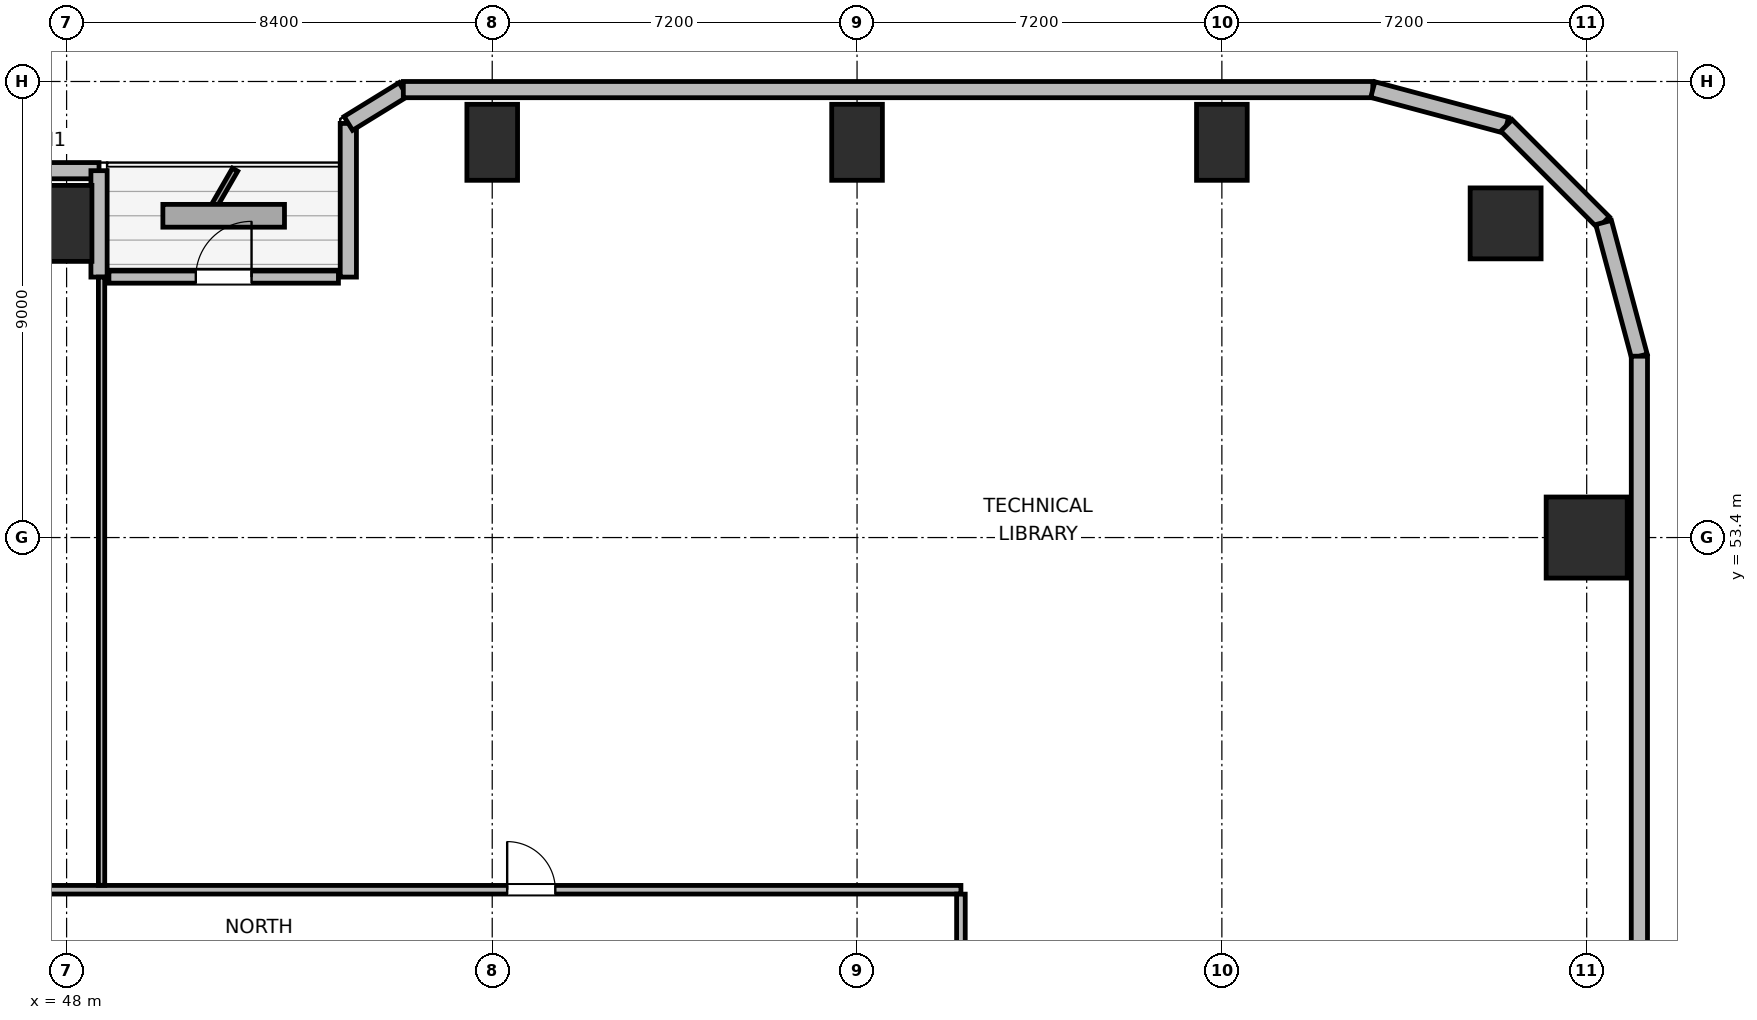
"""IFC4 building model, lengths in metres.
Left out: names, types, materials, properties, quantities, classifications, styles, units other than length and angle.
Written with IfcOpenShell. Run it as: python <this file> out.ifc"""

import sys

from ifc_helpers import new_model, si_unit, direction, frame, frame_2d, origin, origin_2d, place, context, subcontext, project, spatial, rectangle, circle, extrude, element, fill, save


model = new_model("IFC4")
c1 = context("Model", 3, precision=1e-05, world=origin(), true_north=direction((0.0, 1.0)))
c2 = subcontext(c1, "Body", "Model", "MODEL_VIEW")
j1 = project(units=[si_unit("LENGTHUNIT", "METRE"), si_unit("PLANEANGLEUNIT", "RADIAN")], contexts=[c1])
p1 = place(None, origin())
s1 = spatial("IfcSite", under=j1, at=p1, CompositionType="ELEMENT")
p2 = place(p1, origin())
s2 = spatial("IfcBuilding", under=s1, at=p2, CompositionType="ELEMENT")
p3 = place(p2, frame((0.0, 0.0, 25.5)))
s3 = spatial("IfcBuildingStorey", under=s2, at=p3, CompositionType="ELEMENT", Elevation=25.5)
p4 = place(p3, frame((76.4, 59.6, 0.0), z_axis=(0.0, 0.0, 1.0), x_axis=(1.0, 0.0, 0.0)))
e1 = element("IfcColumn", 1, at=p4, inside=s3, PredefinedType="COLUMN", context=c2, shape_type="SweptSolid", body=[
    extrude(circle(Radius=0.7, at=origin_2d()), origin(), (0.0, 0.0, 1.0), 3.9),
])
for number, where, z_axis, x_axis in (
    (2, (48.0, 59.6, 0.0), (0.0, 0.0, 1.0), (1.0, 0.0, 0.0)),
    (3, (56.4, 61.2, 0.0), (0.0, 0.0, 1.0), (1.0, 0.0, 0.0)),
    (4, (63.6, 61.2, 0.0), (0.0, 0.0, 1.0), (1.0, 0.0, 0.0)),
    (5, (70.8, 61.2, 0.0), (0.0, 0.0, 1.0), (1.0, 0.0, 0.0)),
):
    element("IfcColumn", number, at=place(p3, frame(where, z_axis=z_axis, x_axis=x_axis)), inside=s3, PredefinedType="COLUMN", context=c2, shape_type="SweptSolid", body=[
        extrude(rectangle(XDim=1.0, YDim=1.5, at=origin_2d()), origin(), (0.0, 0.0, 1.0), 3.9),
    ])
p5 = place(p3, frame((78.0, 53.4, 0.0), z_axis=(0.0, 0.0, 1.0), x_axis=(1.0, 0.0, 0.0)))
e6 = element("IfcColumn", 6, at=p5, inside=s3, PredefinedType="COLUMN", context=c2, shape_type="SweptSolid", body=[
    extrude(rectangle(XDim=1.6, YDim=1.6, at=origin_2d()), origin(), (0.0, 0.0, 1.0), 3.9),
])
p6 = place(p3, frame((43.955, 60.64, 0.0), z_axis=(0.0, 0.0, 1.0), x_axis=(1.0, 0.0, 0.0)))
e7 = element("IfcWall", 7, at=p6, inside=s3, PredefinedType="SOLIDWALL", context=c2, shape_type="SweptSolid", body=[
    extrude(rectangle(XDim=4.685, YDim=0.32, at=frame_2d((2.343, 0.0))), origin(), (0.0, 0.0, 1.0), 2.875),
])
p7 = place(p6, frame((1.443, 0.0, 0.85)))
e8 = element("IfcOpeningElement", 8, at=p7, cuts=e7, PredefinedType="OPENING", context=c2, shape_type="SweptSolid", body=[
    extrude(rectangle(XDim=1.8, YDim=1.1, at=frame_2d((0.9, 0.55))), frame((0.0, 0.17, 0.0), z_axis=(0.0, -1.0, 0.0), x_axis=(1.0, 0.0, 0.0)), (0.0, 0.0, 1.0), 0.34),
])
p8 = place(p3, frame((48.64, 60.64, 0.0), z_axis=(0.0, 0.0, 1.0), x_axis=(0.0, -1.0, 0.0)))
e9 = element("IfcWall", 9, at=p8, inside=s3, PredefinedType="SOLIDWALL", context=c2, shape_type="SweptSolid", body=[
    extrude(rectangle(XDim=2.1, YDim=0.32, at=frame_2d((1.05, 0.0))), origin(), (0.0, 0.0, 1.0), 2.875),
])
p9 = place(p3, frame((48.835, 58.54, 0.0), z_axis=(0.0, 0.0, 1.0), x_axis=(1.0, 0.0, 0.0)))
e10 = element("IfcWall", 10, at=p9, inside=s3, PredefinedType="SOLIDWALL", context=c2, shape_type="SweptSolid", body=[
    extrude(rectangle(XDim=4.53, YDim=0.24, at=frame_2d((2.265, 0.0))), origin(), (0.0, 0.0, 1.0), 3.64),
])
p10 = place(p9, frame((1.715, 0.0, 0.0)))
e11 = element("IfcOpeningElement", 11, at=p10, cuts=e10, PredefinedType="OPENING", context=c2, shape_type="SweptSolid", body=[
    extrude(rectangle(XDim=1.1, YDim=2.04, at=frame_2d((0.55, 1.02))), frame((0.0, 0.13, 0.0), z_axis=(0.0, -1.0, 0.0), x_axis=(1.0, 0.0, 0.0)), (0.0, 0.0, 1.0), 0.26),
])
p11 = place(p3, frame((53.56, 58.54, 0.0), z_axis=(0.0, 0.0, 1.0), x_axis=(0.0, 1.0, 0.0)))
e12 = element("IfcWall", 12, at=p11, inside=s3, PredefinedType="SOLIDWALL", context=c2, shape_type="SweptSolid", body=[
    extrude(rectangle(XDim=3.032, YDim=0.32, at=frame_2d((1.516, 0.0))), origin(), (0.0, 0.0, 1.0), 2.875),
])
p12 = place(p3, frame((53.56, 61.573, 0.0), z_axis=(0.0, 0.0, 1.0), x_axis=(0.851776724646, 0.523904964045, 0.0)))
e13 = element("IfcWall", 13, at=p12, inside=s3, PredefinedType="SOLIDWALL", context=c2, shape_type="SweptSolid", body=[
    extrude(rectangle(XDim=1.274, YDim=0.32, at=frame_2d((0.637, 0.0))), origin(), (0.0, 0.0, 1.0), 3.64),
])
p13 = place(p3, frame((54.645, 62.24, 0.0), z_axis=(0.0, 0.0, 1.0), x_axis=(1.0, 0.0, 0.0)))
e14 = element("IfcWall", 14, at=p13, inside=s3, PredefinedType="SOLIDWALL", context=c2, shape_type="SweptSolid", body=[
    extrude(rectangle(XDim=19.134, YDim=0.32, at=frame_2d((9.567, 0.0))), origin(), (0.0, 0.0, 1.0), 3.64),
])
p14 = place(p3, frame((73.779, 62.24, 0.0), z_axis=(0.0, 0.0, 1.0), x_axis=(0.965964405026, -0.25867502435, 0.0)))
e15 = element("IfcWall", 15, at=p14, inside=s3, PredefinedType="SOLIDWALL", context=c2, shape_type="SweptSolid", body=[
    extrude(rectangle(XDim=2.731, YDim=0.32, at=frame_2d((1.366, 0.0))), origin(), (0.0, 0.0, 1.0), 3.64),
])
p15 = place(p3, frame((76.417, 61.533, 0.0), z_axis=(0.0, 0.0, 1.0), x_axis=(0.707106781187, -0.707106781187, 0.0)))
e16 = element("IfcWall", 16, at=p15, inside=s3, PredefinedType="SOLIDWALL", context=c2, shape_type="SweptSolid", body=[
    extrude(rectangle(XDim=2.71, YDim=0.32, at=frame_2d((1.355, 0.0))), origin(), (0.0, 0.0, 1.0), 3.64),
])
p16 = place(p3, frame((78.333, 59.617, 0.0), z_axis=(0.0, 0.0, 1.0), x_axis=(0.25869736047, -0.965958423373, 0.0)))
e17 = element("IfcWall", 17, at=p16, inside=s3, PredefinedType="SOLIDWALL", context=c2, shape_type="SweptSolid", body=[
    extrude(rectangle(XDim=2.731, YDim=0.32, at=frame_2d((1.366, 0.0))), origin(), (0.0, 0.0, 1.0), 3.64),
])
p17 = place(p3, frame((79.04, 56.979, 0.0), z_axis=(0.0, 0.0, 1.0), x_axis=(0.0, -1.0, 0.0)))
e18 = element("IfcWall", 18, at=p17, inside=s3, PredefinedType="SOLIDWALL", context=c2, shape_type="SweptSolid", body=[
    extrude(rectangle(XDim=14.219, YDim=0.32, at=frame_2d((7.109, 0.0))), origin(), (0.0, 0.0, 1.0), 3.64),
])
p18 = place(p3, frame((30.35, 46.45, 0.0), z_axis=(0.0, 0.0, 1.0), x_axis=(1.0, 0.0, 0.0)))
e19 = element("IfcWall", 19, at=p18, inside=s3, PredefinedType="PARTITIONING", context=c2, shape_type="SweptSolid", body=[
    extrude(rectangle(XDim=35.3, YDim=0.17, at=frame_2d((17.65, 0.0))), origin(), (0.0, 0.0, 1.0), 3.64),
])
p19 = place(p18, frame((6.21, 0.0, 0.0)))
e20 = element("IfcOpeningElement", 20, at=p19, cuts=e19, PredefinedType="OPENING", context=c2, shape_type="SweptSolid", body=[
    extrude(rectangle(XDim=0.95, YDim=2.04, at=frame_2d((0.475, 1.02))), frame((0.0, 0.095, 0.0), z_axis=(0.0, -1.0, 0.0), x_axis=(1.0, 0.0, 0.0)), (0.0, 0.0, 1.0), 0.19),
])
p20 = place(p18, frame((15.38, 0.0, 0.0)))
e21 = element("IfcOpeningElement", 21, at=p20, cuts=e19, PredefinedType="OPENING", context=c2, shape_type="SweptSolid", body=[
    extrude(rectangle(XDim=0.95, YDim=2.04, at=frame_2d((0.475, 1.02))), frame((0.0, 0.095, 0.0), z_axis=(0.0, -1.0, 0.0), x_axis=(1.0, 0.0, 0.0)), (0.0, 0.0, 1.0), 0.19),
])
p21 = place(p18, frame((26.345, 0.0, 0.0)))
e22 = element("IfcOpeningElement", 22, at=p21, cuts=e19, PredefinedType="OPENING", context=c2, shape_type="SweptSolid", body=[
    extrude(rectangle(XDim=0.95, YDim=2.04, at=frame_2d((0.475, 1.02))), frame((0.0, 0.095, 0.0), z_axis=(0.0, -1.0, 0.0), x_axis=(1.0, 0.0, 0.0)), (0.0, 0.0, 1.0), 0.19),
])
p22 = place(p3, frame((65.65, 25.637, 0.0), z_axis=(0.0, 0.0, 1.0), x_axis=(0.0, 1.0, 0.0)))
e23 = element("IfcWall", 23, at=p22, inside=s3, PredefinedType="PARTITIONING", context=c2, shape_type="SweptSolid", body=[
    extrude(rectangle(XDim=20.726, YDim=0.17, at=frame_2d((10.363, 0.0))), origin(), (0.0, 0.0, 1.0), 3.64),
])
p23 = place(p22, frame((4.163, 0.0, 0.0)))
e24 = element("IfcOpeningElement", 24, at=p23, cuts=e23, PredefinedType="OPENING", context=c2, shape_type="SweptSolid", body=[
    extrude(rectangle(XDim=0.95, YDim=2.04, at=frame_2d((0.475, 1.02))), frame((0.0, 0.095, 0.0), z_axis=(0.0, -1.0, 0.0), x_axis=(1.0, 0.0, 0.0)), (0.0, 0.0, 1.0), 0.19),
])
p24 = place(p22, frame((14.613, 0.0, 0.0)))
e25 = element("IfcOpeningElement", 25, at=p24, cuts=e23, PredefinedType="OPENING", context=c2, shape_type="SweptSolid", body=[
    extrude(rectangle(XDim=0.95, YDim=2.04, at=frame_2d((0.475, 1.02))), frame((0.0, 0.095, 0.0), z_axis=(0.0, -1.0, 0.0), x_axis=(1.0, 0.0, 0.0)), (0.0, 0.0, 1.0), 0.19),
])
p25 = place(p3, frame((48.69, 46.537, 0.0), z_axis=(0.0, 0.0, 1.0), x_axis=(0.0, 1.0, 0.0)))
e26 = element("IfcWall", 26, at=p25, inside=s3, PredefinedType="PARTITIONING", context=c2, shape_type="SweptSolid", body=[
    extrude(rectangle(XDim=12.003, YDim=0.125, at=frame_2d((6.001, 0.0))), origin(), (0.0, 0.0, 1.0), 3.64),
])
p26 = place(p10, origin())
e27 = element("IfcDoor", 27, at=p26, inside=s3, OperationType="SINGLE_SWING_RIGHT", PredefinedType="DOOR", context=c2, shape_type="SweptSolid", body=[
    extrude(rectangle(XDim=1.1, YDim=2.04, at=frame_2d((0.55, 1.02))), frame((0.0, 0.025, 0.0), z_axis=(0.0, -1.0, 0.0), x_axis=(1.0, 0.0, 0.0)), (0.0, 0.0, 1.0), 0.05),
])
fill(e11, e27)
p27 = place(p21, origin())
e28 = element("IfcDoor", 28, at=p27, inside=s3, OperationType="SINGLE_SWING_LEFT", PredefinedType="DOOR", context=c2, shape_type="SweptSolid", body=[
    extrude(rectangle(XDim=0.95, YDim=2.04, at=frame_2d((0.475, 1.02))), frame((0.0, 0.025, 0.0), z_axis=(0.0, -1.0, 0.0), x_axis=(1.0, 0.0, 0.0)), (0.0, 0.0, 1.0), 0.05),
])
fill(e22, e28)
save(model, sys.argv[1])
